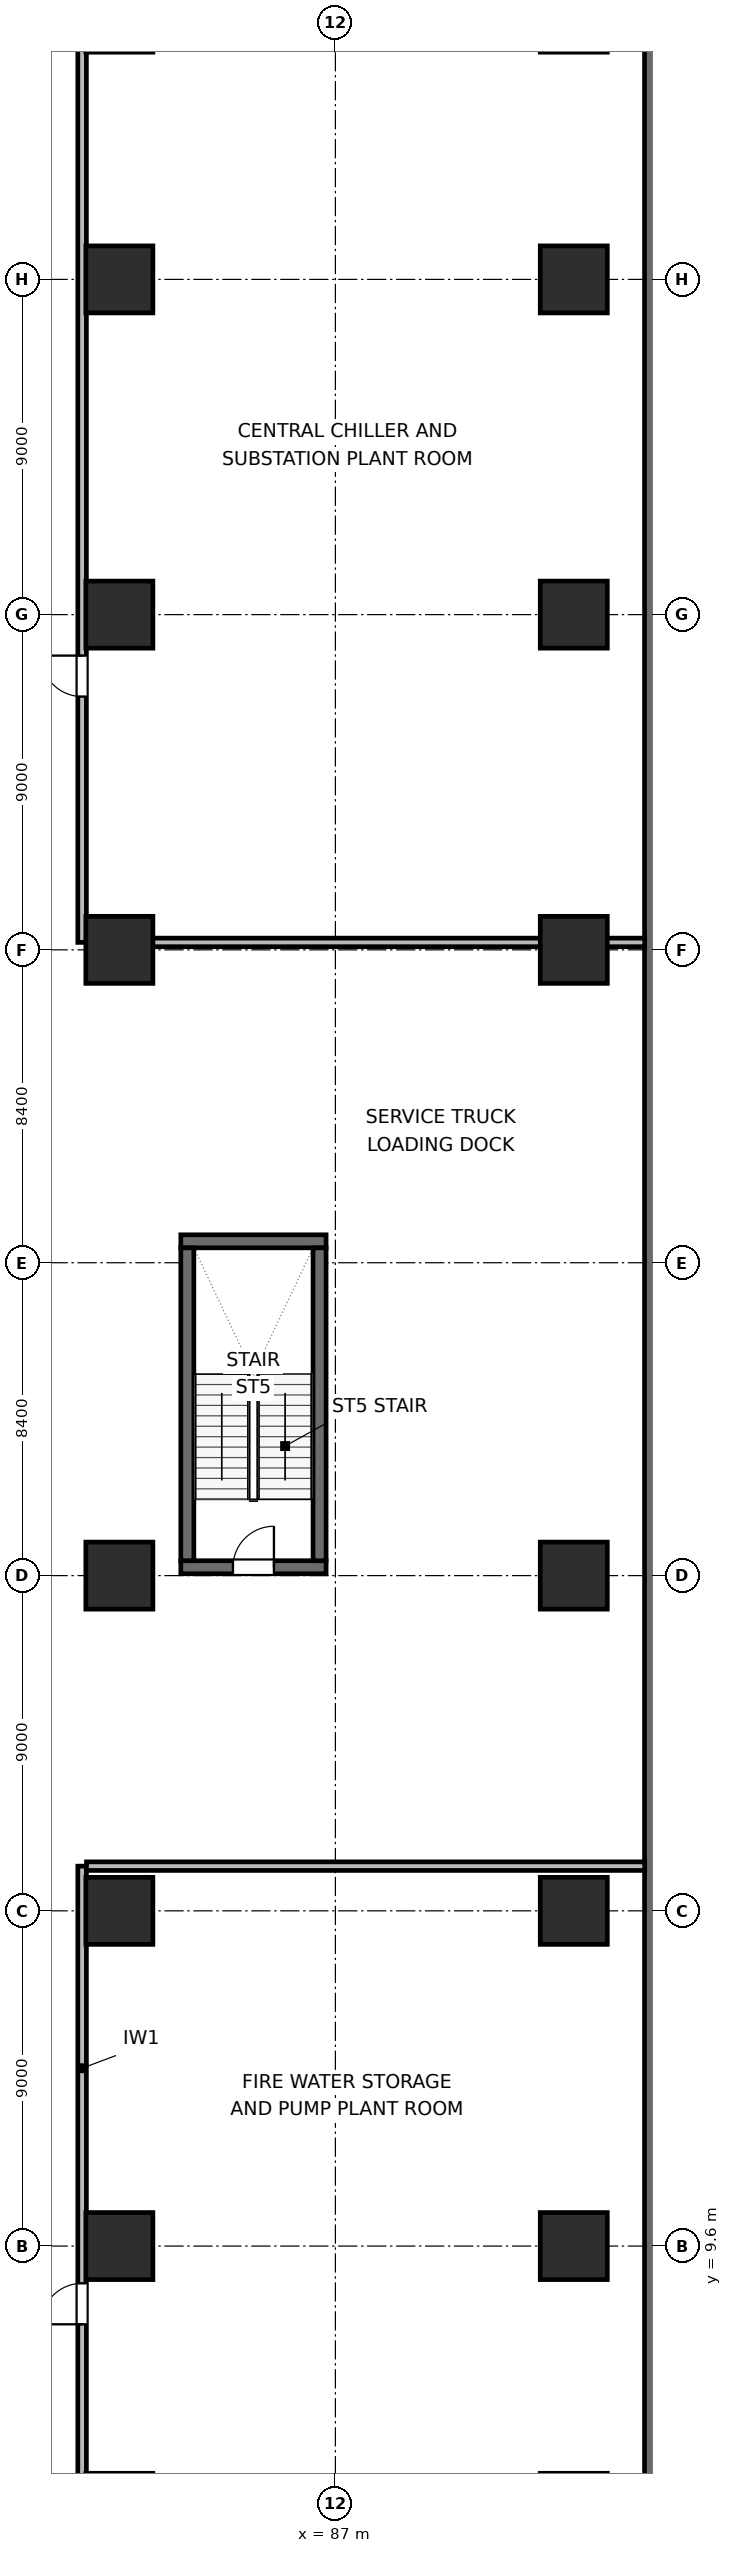
"""IFC4 building model, lengths in metres.
Left out: names, types, materials, properties, quantities, classifications, styles, units other than length and angle.
Written with IfcOpenShell. Run it as: python <this file> out.ifc"""

import sys

from ifc_helpers import new_model, si_unit, direction, frame, frame_2d, origin, origin_2d, place, context, subcontext, project, spatial, rectangle, extrude, element, fill, save


model = new_model("IFC4")
c1 = context("Model", 3, precision=1e-05, world=origin(), true_north=direction((0.0, 1.0)))
c2 = subcontext(c1, "Body", "Model", "MODEL_VIEW")
j1 = project(units=[si_unit("LENGTHUNIT", "METRE"), si_unit("PLANEANGLEUNIT", "RADIAN")], contexts=[c1])
p1 = place(None, origin())
s1 = spatial("IfcSite", under=j1, at=p1, CompositionType="ELEMENT")
p2 = place(p1, origin())
s2 = spatial("IfcBuilding", under=s1, at=p2, CompositionType="ELEMENT")
p3 = place(p2, frame((0.0, 0.0, -4.5)))
s3 = spatial("IfcBuildingStorey", under=s2, at=p3, CompositionType="ELEMENT", Elevation=-4.5)
p4 = place(p3, frame((95.65, 0.7, 0.0), z_axis=(0.0, 0.0, 1.0), x_axis=(0.0, 1.0, 0.0)))
e1 = element("IfcWall", 1, at=p4, inside=s3, PredefinedType="SOLIDWALL", context=c2, shape_type="SweptSolid", body=[
    extrude(rectangle(XDim=70.6, YDim=0.7, at=frame_2d((35.3, 0.0))), origin(), (0.0, 0.0, 1.0), 4.5),
])
p5 = place(p3, frame((82.85, 27.825, 0.0), z_axis=(0.0, 0.0, 1.0), x_axis=(1.0, 0.0, 0.0)))
e2 = element("IfcWall", 2, at=p5, inside=s3, PredefinedType="SHEAR", context=c2, shape_type="SweptSolid", body=[
    extrude(rectangle(XDim=3.9, YDim=0.35, at=frame_2d((1.95, 0.0))), origin(), (0.0, 0.0, 1.0), 4.5),
])
p6 = place(p5, frame((1.4, 0.0, 0.0)))
e3 = element("IfcOpeningElement", 3, at=p6, cuts=e2, PredefinedType="OPENING", context=c2, shape_type="SweptSolid", body=[
    extrude(rectangle(XDim=1.1, YDim=2.05, at=frame_2d((0.55, 1.025))), frame((0.0, 0.185, 0.0), z_axis=(0.0, -1.0, 0.0), x_axis=(1.0, 0.0, 0.0)), (0.0, 0.0, 1.0), 0.37),
])
p7 = place(p3, frame((82.85, 36.575, 0.0), z_axis=(0.0, 0.0, 1.0), x_axis=(1.0, 0.0, 0.0)))
e4 = element("IfcWall", 4, at=p7, inside=s3, PredefinedType="SHEAR", context=c2, shape_type="SweptSolid", body=[
    extrude(rectangle(XDim=3.9, YDim=0.35, at=frame_2d((1.95, 0.0))), origin(), (0.0, 0.0, 1.0), 4.5),
])
for number, where, z_axis, x_axis in (
    (5, (83.025, 28.0, 0.0), (0.0, 0.0, 1.0), (0.0, 1.0, 0.0)),
    (6, (86.575, 28.0, 0.0), (0.0, 0.0, 1.0), (0.0, 1.0, 0.0)),
):
    element("IfcWall", number, at=place(p3, frame(where, z_axis=z_axis, x_axis=x_axis)), inside=s3, PredefinedType="SHEAR", context=c2, shape_type="SweptSolid", body=[
        extrude(rectangle(XDim=8.4, YDim=0.35, at=frame_2d((4.2, 0.0))), origin(), (0.0, 0.0, 1.0), 4.5),
    ])
for number, where, z_axis, x_axis in (
    (7, (81.2, 2.6, 0.0), (0.0, 0.0, 1.0), (1.0, 0.0, 0.0)),
    (8, (81.2, 9.6, 0.0), (0.0, 0.0, 1.0), (1.0, 0.0, 0.0)),
    (9, (81.2, 18.6, 0.0), (0.0, 0.0, 1.0), (1.0, 0.0, 0.0)),
    (10, (81.2, 27.6, 0.0), (0.0, 0.0, 1.0), (1.0, 0.0, 0.0)),
    (11, (81.2, 44.4, 0.0), (0.0, 0.0, 1.0), (1.0, 0.0, 0.0)),
    (12, (81.2, 53.4, 0.0), (0.0, 0.0, 1.0), (1.0, 0.0, 0.0)),
    (13, (81.2, 62.4, 0.0), (0.0, 0.0, 1.0), (1.0, 0.0, 0.0)),
    (14, (81.2, 69.4, 0.0), (0.0, 0.0, 1.0), (1.0, 0.0, 0.0)),
    (15, (93.4, 2.6, 0.0), (0.0, 0.0, 1.0), (1.0, 0.0, 0.0)),
    (16, (93.4, 9.6, 0.0), (0.0, 0.0, 1.0), (1.0, 0.0, 0.0)),
    (17, (93.4, 18.6, 0.0), (0.0, 0.0, 1.0), (1.0, 0.0, 0.0)),
    (18, (93.4, 27.6, 0.0), (0.0, 0.0, 1.0), (1.0, 0.0, 0.0)),
    (19, (93.4, 44.4, 0.0), (0.0, 0.0, 1.0), (1.0, 0.0, 0.0)),
    (20, (93.4, 53.4, 0.0), (0.0, 0.0, 1.0), (1.0, 0.0, 0.0)),
    (21, (93.4, 62.4, 0.0), (0.0, 0.0, 1.0), (1.0, 0.0, 0.0)),
    (22, (93.4, 69.4, 0.0), (0.0, 0.0, 1.0), (1.0, 0.0, 0.0)),
):
    element("IfcColumn", number, at=place(p3, frame(where, z_axis=z_axis, x_axis=x_axis)), inside=s3, PredefinedType="COLUMN", context=c2, shape_type="SweptSolid", body=[
        extrude(rectangle(XDim=1.8, YDim=1.8, at=origin_2d()), origin(), (0.0, 0.0, 1.0), 4.5),
    ])
p8 = place(p3, frame((80.2, 0.695, 0.0), z_axis=(0.0, 0.0, 1.0), x_axis=(0.0, 1.0, 0.0)))
e23 = element("IfcWall", 23, at=p8, inside=s3, PredefinedType="PARTITIONING", context=c2, shape_type="SweptSolid", body=[
    extrude(rectangle(XDim=19.105, YDim=0.23, at=frame_2d((9.552, 0.0))), origin(), (0.0, 0.0, 1.0), 4.18),
])
p9 = place(p8, frame((6.805, 0.0, 0.0)))
e24 = element("IfcOpeningElement", 24, at=p9, cuts=e23, PredefinedType="OPENING", context=c2, shape_type="SweptSolid", body=[
    extrude(rectangle(XDim=1.1, YDim=2.05, at=frame_2d((0.55, 1.025))), frame((0.0, 0.125, 0.0), z_axis=(0.0, -1.0, 0.0), x_axis=(1.0, 0.0, 0.0)), (0.0, 0.0, 1.0), 0.25),
])
p10 = place(p3, frame((80.317, 19.8, 0.0), z_axis=(0.0, 0.0, 1.0), x_axis=(1.0, 0.0, 0.0)))
e25 = element("IfcWall", 25, at=p10, inside=s3, PredefinedType="PARTITIONING", context=c2, shape_type="SweptSolid", body=[
    extrude(rectangle(XDim=14.988, YDim=0.23, at=frame_2d((7.494, 0.0))), origin(), (0.0, 0.0, 1.0), 4.18),
])
p11 = place(p3, frame((80.2, 44.6, 0.0), z_axis=(0.0, 0.0, 1.0), x_axis=(0.0, 1.0, 0.0)))
e26 = element("IfcWall", 26, at=p11, inside=s3, PredefinedType="PARTITIONING", context=c2, shape_type="SweptSolid", body=[
    extrude(rectangle(XDim=26.705, YDim=0.23, at=frame_2d((13.353, 0.0))), origin(), (0.0, 0.0, 1.0), 4.18),
])
p12 = place(p11, frame((6.6, 0.0, 0.0)))
e27 = element("IfcOpeningElement", 27, at=p12, cuts=e26, PredefinedType="OPENING", context=c2, shape_type="SweptSolid", body=[
    extrude(rectangle(XDim=1.1, YDim=2.05, at=frame_2d((0.55, 1.025))), frame((0.0, 0.125, 0.0), z_axis=(0.0, -1.0, 0.0), x_axis=(1.0, 0.0, 0.0)), (0.0, 0.0, 1.0), 0.25),
])
p13 = place(p3, frame((80.317, 44.6, 0.0), z_axis=(0.0, 0.0, 1.0), x_axis=(1.0, 0.0, 0.0)))
e28 = element("IfcWall", 28, at=p13, inside=s3, PredefinedType="PARTITIONING", context=c2, shape_type="SweptSolid", body=[
    extrude(rectangle(XDim=14.988, YDim=0.23, at=frame_2d((7.494, 0.0))), origin(), (0.0, 0.0, 1.0), 3.31),
])
p14 = place(p6, origin())
e29 = element("IfcDoor", 29, at=p14, inside=s3, OperationType="SINGLE_SWING_RIGHT", PredefinedType="DOOR", context=c2, shape_type="SweptSolid", body=[
    extrude(rectangle(XDim=1.1, YDim=2.05, at=frame_2d((0.55, 1.025))), frame((0.0, 0.025, 0.0), z_axis=(0.0, -1.0, 0.0), x_axis=(1.0, 0.0, 0.0)), (0.0, 0.0, 1.0), 0.05),
])
fill(e3, e29)
p15 = place(p9, origin())
e30 = element("IfcDoor", 30, at=p15, inside=s3, OperationType="SINGLE_SWING_LEFT", PredefinedType="DOOR", context=c2, shape_type="SweptSolid", body=[
    extrude(rectangle(XDim=1.1, YDim=2.05, at=frame_2d((0.55, 1.025))), frame((0.0, 0.025, 0.0), z_axis=(0.0, -1.0, 0.0), x_axis=(1.0, 0.0, 0.0)), (0.0, 0.0, 1.0), 0.05),
])
fill(e24, e30)
p16 = place(p12, origin())
e31 = element("IfcDoor", 31, at=p16, inside=s3, OperationType="SINGLE_SWING_RIGHT", PredefinedType="DOOR", context=c2, shape_type="SweptSolid", body=[
    extrude(rectangle(XDim=1.1, YDim=2.05, at=frame_2d((0.55, 1.025))), frame((0.0, 0.025, 0.0), z_axis=(0.0, -1.0, 0.0), x_axis=(1.0, 0.0, 0.0)), (0.0, 0.0, 1.0), 0.05),
])
fill(e27, e31)
save(model, sys.argv[1])
